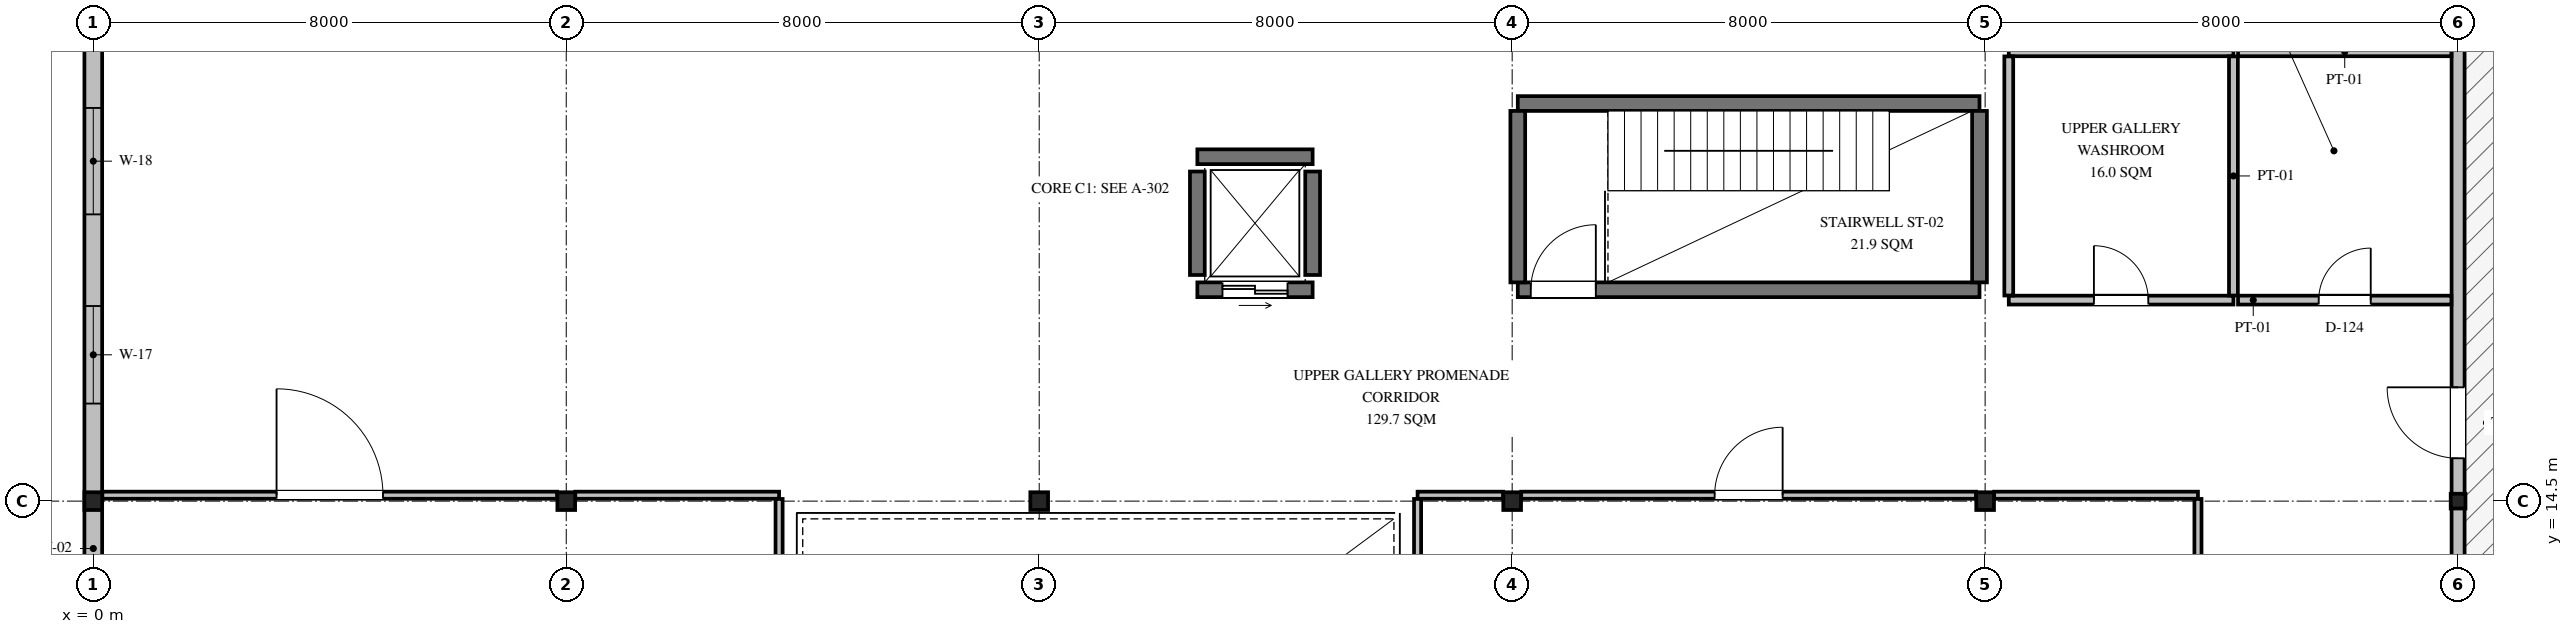
"""IFC4 building model, lengths in metres.
Left out: names, types, materials, properties, quantities, classifications, styles, units other than length and angle.
Written with IfcOpenShell. Run it as: python <this file> out.ifc"""

import sys

from ifc_helpers import new_model, si_unit, direction, frame, frame_2d, origin, origin_2d, place, context, subcontext, project, spatial, rectangle, hollow_rectangle, i_section, extrude, element, fill, save


model = new_model("IFC4")
c1 = context("Model", 3, precision=1e-05, world=origin(), true_north=direction((0.0, 1.0)))
c2 = subcontext(c1, "Body", "Model", "MODEL_VIEW")
j1 = project(units=[si_unit("LENGTHUNIT", "METRE"), si_unit("PLANEANGLEUNIT", "RADIAN")], contexts=[c1])
p1 = place(None, origin())
s1 = spatial("IfcSite", under=j1, at=p1, CompositionType="ELEMENT")
p2 = place(p1, origin())
s2 = spatial("IfcBuilding", under=s1, at=p2, CompositionType="ELEMENT")
p3 = place(p2, frame((0.0, 0.0, 5.85)))
s3 = spatial("IfcBuildingStorey", under=s2, at=p3, CompositionType="ELEMENT", Elevation=5.85)
for number, where, z_axis, x_axis in (
    (1, (0.0, 14.5, 0.0), (0.0, 0.0, 1.0), (1.0, 0.0, 0.0)),
    (2, (8.0, 14.5, 0.0), (0.0, 0.0, 1.0), (1.0, 0.0, 0.0)),
    (3, (16.0, 14.5, 0.0), (0.0, 0.0, 1.0), (1.0, 0.0, 0.0)),
    (4, (24.0, 14.5, 0.0), (0.0, 0.0, 1.0), (1.0, 0.0, 0.0)),
    (5, (32.0, 14.5, 0.0), (0.0, 0.0, 1.0), (1.0, 0.0, 0.0)),
):
    element("IfcColumn", number, at=place(p3, frame(where, z_axis=z_axis, x_axis=x_axis)), inside=s3, PredefinedType="COLUMN", context=c2, shape_type="SweptSolid", body=[
        extrude(i_section(OverallWidth=0.3, OverallDepth=0.3, WebThickness=0.01, FlangeThickness=0.015, FilletRadius=0.018, at=origin_2d()), origin(), (0.0, 0.0, 1.0), 4.2),
    ])
p4 = place(p3, frame((40.0, 14.5, 0.0), z_axis=(0.0, 0.0, 1.0), x_axis=(1.0, 0.0, 0.0)))
e6 = element("IfcColumn", 6, at=p4, inside=s3, PredefinedType="COLUMN", context=c2, shape_type="SweptSolid", body=[
    extrude(hollow_rectangle(XDim=0.25, YDim=0.25, WallThickness=0.012, at=origin_2d()), origin(), (0.0, 0.0, 1.0), 4.2),
])
p5 = place(p3, frame((0.0, 0.15, 0.0), z_axis=(0.0, 0.0, 1.0), x_axis=(0.0, 1.0, 0.0)))
e7 = element("IfcWall", 7, at=p5, inside=s3, PredefinedType="SOLIDWALL", context=c2, shape_type="SweptSolid", body=[
    extrude(rectangle(XDim=22.2, YDim=0.3, at=frame_2d((11.1, 0.0))), origin(), (0.0, 0.0, 1.0), 3.344),
])
p6 = place(p5, frame((9.2, 0.0, 1.05)))
e8 = element("IfcOpeningElement", 8, at=p6, cuts=e7, PredefinedType="OPENING", context=c2, shape_type="SweptSolid", body=[
    extrude(rectangle(XDim=1.5, YDim=1.5, at=frame_2d((0.75, 0.75))), frame((0.0, 0.16, 0.0), z_axis=(0.0, -1.0, 0.0), x_axis=(1.0, 0.0, 0.0)), (0.0, 0.0, 1.0), 0.32),
])
p7 = place(p5, frame((16.0, 0.0, 1.05)))
e9 = element("IfcOpeningElement", 9, at=p7, cuts=e7, PredefinedType="OPENING", context=c2, shape_type="SweptSolid", body=[
    extrude(rectangle(XDim=1.65, YDim=1.5, at=frame_2d((0.825, 0.75))), frame((0.0, 0.16, 0.0), z_axis=(0.0, -1.0, 0.0), x_axis=(1.0, 0.0, 0.0)), (0.0, 0.0, 1.0), 0.32),
])
p8 = place(p5, frame((19.2, 0.0, 1.05)))
e10 = element("IfcOpeningElement", 10, at=p8, cuts=e7, PredefinedType="OPENING", context=c2, shape_type="SweptSolid", body=[
    extrude(rectangle(XDim=1.8, YDim=1.5, at=frame_2d((0.9, 0.75))), frame((0.0, 0.16, 0.0), z_axis=(0.0, -1.0, 0.0), x_axis=(1.0, 0.0, 0.0)), (0.0, 0.0, 1.0), 0.32),
])
p9 = place(p3, frame((40.0, 0.125, 0.0), z_axis=(0.0, 0.0, 1.0), x_axis=(0.0, 1.0, 0.0)))
e11 = element("IfcWall", 11, at=p9, inside=s3, PredefinedType="SOLIDWALL", context=c2, shape_type="SweptSolid", body=[
    extrude(rectangle(XDim=22.25, YDim=0.22, at=frame_2d((11.125, 0.0))), origin(), (0.0, 0.0, 1.0), 3.554),
])
p10 = place(p9, frame((15.1, 0.0, 0.0)))
e12 = element("IfcOpeningElement", 12, at=p10, cuts=e11, PredefinedType="OPENING", context=c2, shape_type="SweptSolid", body=[
    extrude(rectangle(XDim=1.2, YDim=2.2, at=frame_2d((0.6, 1.1))), frame((0.0, 0.12, 0.0), z_axis=(0.0, -1.0, 0.0), x_axis=(1.0, 0.0, 0.0)), (0.0, 0.0, 1.0), 0.24),
])
p11 = place(p9, frame((3.0, 0.0, 1.0)))
e13 = element("IfcOpeningElement", 13, at=p11, cuts=e11, PredefinedType="OPENING", context=c2, shape_type="SweptSolid", body=[
    extrude(rectangle(XDim=1.3, YDim=1.3, at=frame_2d((0.65, 0.65))), frame((0.0, 0.12, 0.0), z_axis=(0.0, -1.0, 0.0), x_axis=(1.0, 0.0, 0.0)), (0.0, 0.0, 1.0), 0.24),
])
p12 = place(p9, frame((9.5, 0.0, 1.0)))
e14 = element("IfcOpeningElement", 14, at=p12, cuts=e11, PredefinedType="OPENING", context=c2, shape_type="SweptSolid", body=[
    extrude(rectangle(XDim=1.55, YDim=1.3, at=frame_2d((0.775, 0.65))), frame((0.0, 0.12, 0.0), z_axis=(0.0, -1.0, 0.0), x_axis=(1.0, 0.0, 0.0)), (0.0, 0.0, 1.0), 0.24),
])
p13 = place(p3, frame((24.095, 18.075, 0.0), z_axis=(0.0, 0.0, 1.0), x_axis=(1.0, 0.0, 0.0)))
e15 = element("IfcWall", 15, at=p13, inside=s3, PredefinedType="SHEAR", context=c2, shape_type="SweptSolid", body=[
    extrude(rectangle(XDim=7.81, YDim=0.25, at=frame_2d((3.905, 0.0))), origin(), (0.0, 0.0, 1.0), 4.0),
])
p14 = place(p13, frame((0.22, 0.0, 0.0)))
e16 = element("IfcOpeningElement", 16, at=p14, cuts=e15, PredefinedType="OPENING", context=c2, shape_type="SweptSolid", body=[
    extrude(rectangle(XDim=1.1, YDim=2.15, at=frame_2d((0.55, 1.075))), frame((0.0, 0.135, 0.0), z_axis=(0.0, -1.0, 0.0), x_axis=(1.0, 0.0, 0.0)), (0.0, 0.0, 1.0), 0.27),
])
p15 = place(p3, frame((24.095, 21.225, 0.0), z_axis=(0.0, 0.0, 1.0), x_axis=(1.0, 0.0, 0.0)))
e17 = element("IfcWall", 17, at=p15, inside=s3, PredefinedType="SHEAR", context=c2, shape_type="SweptSolid", body=[
    extrude(rectangle(XDim=7.81, YDim=0.25, at=frame_2d((3.905, 0.0))), origin(), (0.0, 0.0, 1.0), 4.0),
])
for number, where, z_axis, x_axis in (
    (18, (24.095, 18.2, 0.0), (0.0, 0.0, 1.0), (0.0, 1.0, 0.0)),
    (19, (31.905, 18.2, 0.0), (0.0, 0.0, 1.0), (0.0, 1.0, 0.0)),
):
    element("IfcWall", number, at=place(p3, frame(where, z_axis=z_axis, x_axis=x_axis)), inside=s3, PredefinedType="SHEAR", context=c2, shape_type="SweptSolid", body=[
        extrude(rectangle(XDim=2.9, YDim=0.25, at=frame_2d((1.45, 0.0))), origin(), (0.0, 0.0, 1.0), 4.0),
    ])
p16 = place(p3, frame((18.675, 18.075, 0.0), z_axis=(0.0, 0.0, 1.0), x_axis=(1.0, 0.0, 0.0)))
e20 = element("IfcWall", 20, at=p16, inside=s3, PredefinedType="SHEAR", context=c2, shape_type="SweptSolid", body=[
    extrude(rectangle(XDim=1.95, YDim=0.25, at=frame_2d((0.975, 0.0))), origin(), (0.0, 0.0, 1.0), 4.0),
])
p17 = place(p16, frame((0.425, 0.0, 0.0)))
e21 = element("IfcOpeningElement", 21, at=p17, cuts=e20, PredefinedType="OPENING", context=c2, shape_type="SweptSolid", body=[
    extrude(rectangle(XDim=1.1, YDim=2.15, at=frame_2d((0.55, 1.075))), frame((0.0, 0.135, 0.0), z_axis=(0.0, -1.0, 0.0), x_axis=(1.0, 0.0, 0.0)), (0.0, 0.0, 1.0), 0.27),
])
p18 = place(p3, frame((18.675, 20.325, 0.0), z_axis=(0.0, 0.0, 1.0), x_axis=(1.0, 0.0, 0.0)))
e22 = element("IfcWall", 22, at=p18, inside=s3, PredefinedType="SHEAR", context=c2, shape_type="SweptSolid", body=[
    extrude(rectangle(XDim=1.95, YDim=0.25, at=frame_2d((0.975, 0.0))), origin(), (0.0, 0.0, 1.0), 4.0),
])
for number, where, z_axis, x_axis in (
    (23, (18.675, 18.325, 0.0), (0.0, 0.0, 1.0), (0.0, 1.0, 0.0)),
    (24, (20.625, 18.325, 0.0), (0.0, 0.0, 1.0), (0.0, 1.0, 0.0)),
):
    element("IfcWall", number, at=place(p3, frame(where, z_axis=z_axis, x_axis=x_axis)), inside=s3, PredefinedType="SHEAR", context=c2, shape_type="SweptSolid", body=[
        extrude(rectangle(XDim=1.75, YDim=0.25, at=frame_2d((0.875, 0.0))), origin(), (0.0, 0.0, 1.0), 4.0),
    ])
p19 = place(p3, frame((0.153, 14.6, 0.0), z_axis=(0.0, 0.0, 1.0), x_axis=(1.0, 0.0, 0.0)))
e25 = element("IfcWall", 25, at=p19, inside=s3, PredefinedType="PARTITIONING", context=c2, shape_type="SweptSolid", body=[
    extrude(rectangle(XDim=7.694, YDim=0.12, at=frame_2d((3.847, 0.0))), origin(), (0.0, 0.0, 1.0), 3.406),
])
p20 = place(p19, frame((2.947, 0.0, 0.0)))
e26 = element("IfcOpeningElement", 26, at=p20, cuts=e25, PredefinedType="OPENING", context=c2, shape_type="SweptSolid", body=[
    extrude(rectangle(XDim=1.8, YDim=2.3, at=frame_2d((0.9, 1.15))), frame((0.0, 0.07, 0.0), z_axis=(0.0, -1.0, 0.0), x_axis=(1.0, 0.0, 0.0)), (0.0, 0.0, 1.0), 0.14),
])
p21 = place(p3, frame((8.153, 14.6, 0.0), z_axis=(0.0, 0.0, 1.0), x_axis=(1.0, 0.0, 0.0)))
e27 = element("IfcWall", 27, at=p21, inside=s3, PredefinedType="PARTITIONING", context=c2, shape_type="SweptSolid", body=[
    extrude(rectangle(XDim=3.447, YDim=0.12, at=frame_2d((1.724, 0.0))), origin(), (0.0, 0.0, 1.0), 3.194),
])
p22 = place(p3, frame((11.6, 6.663, 0.0), z_axis=(0.0, 0.0, 1.0), x_axis=(0.0, 1.0, 0.0)))
e28 = element("IfcWall", 28, at=p22, inside=s3, PredefinedType="PARTITIONING", context=c2, shape_type="SweptSolid", body=[
    extrude(rectangle(XDim=7.874, YDim=0.12, at=frame_2d((3.937, 0.0))), origin(), (0.0, 0.0, 1.0), 4.0),
])
p23 = place(p3, frame((22.4, 14.6, 0.0), z_axis=(0.0, 0.0, 1.0), x_axis=(1.0, 0.0, 0.0)))
e29 = element("IfcWall", 29, at=p23, inside=s3, PredefinedType="PARTITIONING", context=c2, shape_type="SweptSolid", body=[
    extrude(rectangle(XDim=1.447, YDim=0.12, at=frame_2d((0.724, 0.0))), origin(), (0.0, 0.0, 1.0), 3.094),
])
p24 = place(p3, frame((24.153, 14.6, 0.0), z_axis=(0.0, 0.0, 1.0), x_axis=(1.0, 0.0, 0.0)))
e30 = element("IfcWall", 30, at=p24, inside=s3, PredefinedType="PARTITIONING", context=c2, shape_type="SweptSolid", body=[
    extrude(rectangle(XDim=7.694, YDim=0.12, at=frame_2d((3.847, 0.0))), origin(), (0.0, 0.0, 1.0), 2.894),
])
p25 = place(p24, frame((3.272, 0.0, 0.0)))
e31 = element("IfcOpeningElement", 31, at=p25, cuts=e30, PredefinedType="OPENING", context=c2, shape_type="SweptSolid", body=[
    extrude(rectangle(XDim=1.15, YDim=2.1, at=frame_2d((0.575, 1.05))), frame((0.0, 0.07, 0.0), z_axis=(0.0, -1.0, 0.0), x_axis=(1.0, 0.0, 0.0)), (0.0, 0.0, 1.0), 0.14),
])
p26 = place(p3, frame((32.153, 14.6, 0.0), z_axis=(0.0, 0.0, 1.0), x_axis=(1.0, 0.0, 0.0)))
e32 = element("IfcWall", 32, at=p26, inside=s3, PredefinedType="PARTITIONING", context=c2, shape_type="SweptSolid", body=[
    extrude(rectangle(XDim=3.447, YDim=0.12, at=frame_2d((1.724, 0.0))), origin(), (0.0, 0.0, 1.0), 3.344),
])
for number, where, z_axis, x_axis in (
    (33, (22.4, 6.663, 0.0), (0.0, 0.0, 1.0), (0.0, 1.0, 0.0)),
    (34, (35.6, 6.663, 0.0), (0.0, 0.0, 1.0), (0.0, 1.0, 0.0)),
):
    element("IfcWall", number, at=place(p3, frame(where, z_axis=z_axis, x_axis=x_axis)), inside=s3, PredefinedType="PARTITIONING", context=c2, shape_type="SweptSolid", body=[
        extrude(rectangle(XDim=7.874, YDim=0.12, at=frame_2d((3.937, 0.0))), origin(), (0.0, 0.0, 1.0), 4.0),
    ])
p27 = place(p3, frame((32.4, 17.9, 0.0), z_axis=(0.0, 0.0, 1.0), x_axis=(1.0, 0.0, 0.0)))
e35 = element("IfcWall", 35, at=p27, inside=s3, PredefinedType="PARTITIONING", context=c2, shape_type="SweptSolid", body=[
    extrude(rectangle(XDim=3.8, YDim=0.15, at=frame_2d((1.9, 0.0))), origin(), (0.0, 0.0, 1.0), 4.0),
])
p28 = place(p27, frame((1.44, 0.0, 0.0)))
e36 = element("IfcOpeningElement", 36, at=p28, cuts=e35, PredefinedType="OPENING", context=c2, shape_type="SweptSolid", body=[
    extrude(rectangle(XDim=0.92, YDim=2.1, at=frame_2d((0.46, 1.05))), frame((0.0, 0.085, 0.0), z_axis=(0.0, -1.0, 0.0), x_axis=(1.0, 0.0, 0.0)), (0.0, 0.0, 1.0), 0.17),
])
p29 = place(p3, frame((32.4, 22.1, 0.0), z_axis=(0.0, 0.0, 1.0), x_axis=(1.0, 0.0, 0.0)))
e37 = element("IfcWall", 37, at=p29, inside=s3, PredefinedType="PARTITIONING", context=c2, shape_type="SweptSolid", body=[
    extrude(rectangle(XDim=3.8, YDim=0.15, at=frame_2d((1.9, 0.0))), origin(), (0.0, 0.0, 1.0), 4.0),
])
p30 = place(p3, frame((32.4, 17.978, 0.0), z_axis=(0.0, 0.0, 1.0), x_axis=(0.0, 1.0, 0.0)))
e38 = element("IfcWall", 38, at=p30, inside=s3, PredefinedType="PARTITIONING", context=c2, shape_type="SweptSolid", body=[
    extrude(rectangle(XDim=4.044, YDim=0.15, at=frame_2d((2.022, 0.0))), origin(), (0.0, 0.0, 1.0), 4.0),
])
p31 = place(p3, frame((36.2, 17.978, 0.0), z_axis=(0.0, 0.0, 1.0), x_axis=(0.0, 1.0, 0.0)))
e39 = element("IfcWall", 39, at=p31, inside=s3, PredefinedType="PARTITIONING", context=c2, shape_type="SweptSolid", body=[
    extrude(rectangle(XDim=4.044, YDim=0.15, at=frame_2d((2.022, 0.0))), origin(), (0.0, 0.0, 1.0), 3.744),
])
p32 = place(p3, frame((36.278, 17.9, 0.0), z_axis=(0.0, 0.0, 1.0), x_axis=(1.0, 0.0, 0.0)))
e40 = element("IfcWall", 40, at=p32, inside=s3, PredefinedType="PARTITIONING", context=c2, shape_type="SweptSolid", body=[
    extrude(rectangle(XDim=3.609, YDim=0.15, at=frame_2d((1.804, 0.0))), origin(), (0.0, 0.0, 1.0), 4.0),
])
p33 = place(p32, frame((1.365, 0.0, 0.0)))
e41 = element("IfcOpeningElement", 41, at=p33, cuts=e40, PredefinedType="OPENING", context=c2, shape_type="SweptSolid", body=[
    extrude(rectangle(XDim=0.88, YDim=2.1, at=frame_2d((0.44, 1.05))), frame((0.0, 0.085, 0.0), z_axis=(0.0, -1.0, 0.0), x_axis=(1.0, 0.0, 0.0)), (0.0, 0.0, 1.0), 0.17),
])
p34 = place(p3, frame((36.278, 22.1, 0.0), z_axis=(0.0, 0.0, 1.0), x_axis=(1.0, 0.0, 0.0)))
e42 = element("IfcWall", 42, at=p34, inside=s3, PredefinedType="PARTITIONING", context=c2, shape_type="SweptSolid", body=[
    extrude(rectangle(XDim=3.609, YDim=0.15, at=frame_2d((1.804, 0.0))), origin(), (0.0, 0.0, 1.0), 4.0),
])
p35 = place(p7, origin())
e43 = element("IfcWindow", 43, at=p35, inside=s3, PartitioningType="SINGLE_PANEL", PredefinedType="WINDOW", context=c2, shape_type="SweptSolid", body=[
    extrude(rectangle(XDim=1.65, YDim=1.5, at=frame_2d((0.825, 0.75))), frame((0.0, 0.03, 0.0), z_axis=(0.0, -1.0, 0.0), x_axis=(1.0, 0.0, 0.0)), (0.0, 0.0, 1.0), 0.06),
])
fill(e9, e43)
p36 = place(p8, origin())
e44 = element("IfcWindow", 44, at=p36, inside=s3, PartitioningType="SINGLE_PANEL", PredefinedType="WINDOW", context=c2, shape_type="SweptSolid", body=[
    extrude(rectangle(XDim=1.8, YDim=1.5, at=frame_2d((0.9, 0.75))), frame((0.0, 0.03, 0.0), z_axis=(0.0, -1.0, 0.0), x_axis=(1.0, 0.0, 0.0)), (0.0, 0.0, 1.0), 0.06),
])
fill(e10, e44)
p37 = place(p10, frame((1.2, 0.0, 0.0), z_axis=(0.0, 0.0, 1.0), x_axis=(-1.0, 0.0, 0.0)))
e45 = element("IfcDoor", 45, at=p37, inside=s3, OperationType="SINGLE_SWING_RIGHT", PredefinedType="DOOR", context=c2, shape_type="SweptSolid", body=[
    extrude(rectangle(XDim=1.2, YDim=2.2, at=frame_2d((0.6, 1.1))), frame((0.0, 0.025, 0.0), z_axis=(0.0, -1.0, 0.0), x_axis=(1.0, 0.0, 0.0)), (0.0, 0.0, 1.0), 0.05),
])
fill(e12, e45)
p38 = place(p14, frame((1.1, 0.0, 0.0), z_axis=(0.0, 0.0, 1.0), x_axis=(-1.0, 0.0, 0.0)))
e46 = element("IfcDoor", 46, at=p38, inside=s3, OperationType="SINGLE_SWING_RIGHT", PredefinedType="DOOR", context=c2, shape_type="SweptSolid", body=[
    extrude(rectangle(XDim=1.1, YDim=2.15, at=frame_2d((0.55, 1.075))), frame((0.0, 0.025, 0.0), z_axis=(0.0, -1.0, 0.0), x_axis=(1.0, 0.0, 0.0)), (0.0, 0.0, 1.0), 0.05),
])
fill(e16, e46)
p39 = place(p17, origin())
e47 = element("IfcDoor", 47, at=p39, inside=s3, OperationType="DOUBLE_DOOR_SLIDING", PredefinedType="DOOR", context=c2, shape_type="SweptSolid", body=[
    extrude(rectangle(XDim=1.1, YDim=2.15, at=frame_2d((0.55, 1.075))), frame((0.0, 0.025, 0.0), z_axis=(0.0, -1.0, 0.0), x_axis=(1.0, 0.0, 0.0)), (0.0, 0.0, 1.0), 0.05),
])
fill(e21, e47)
p40 = place(p20, origin())
e48 = element("IfcDoor", 48, at=p40, inside=s3, OperationType="SINGLE_SWING_LEFT", PredefinedType="DOOR", context=c2, shape_type="SweptSolid", body=[
    extrude(rectangle(XDim=1.8, YDim=2.3, at=frame_2d((0.9, 1.15))), frame((0.0, 0.025, 0.0), z_axis=(0.0, -1.0, 0.0), x_axis=(1.0, 0.0, 0.0)), (0.0, 0.0, 1.0), 0.05),
])
fill(e26, e48)
p41 = place(p25, origin())
e49 = element("IfcDoor", 49, at=p41, inside=s3, OperationType="SINGLE_SWING_RIGHT", PredefinedType="DOOR", context=c2, shape_type="SweptSolid", body=[
    extrude(rectangle(XDim=1.15, YDim=2.1, at=frame_2d((0.575, 1.05))), frame((0.0, 0.025, 0.0), z_axis=(0.0, -1.0, 0.0), x_axis=(1.0, 0.0, 0.0)), (0.0, 0.0, 1.0), 0.05),
])
fill(e31, e49)
p42 = place(p28, origin())
e50 = element("IfcDoor", 50, at=p42, inside=s3, OperationType="SINGLE_SWING_LEFT", PredefinedType="DOOR", context=c2, shape_type="SweptSolid", body=[
    extrude(rectangle(XDim=0.92, YDim=2.1, at=frame_2d((0.46, 1.05))), frame((0.0, 0.025, 0.0), z_axis=(0.0, -1.0, 0.0), x_axis=(1.0, 0.0, 0.0)), (0.0, 0.0, 1.0), 0.05),
])
fill(e36, e50)
p43 = place(p33, origin())
e51 = element("IfcDoor", 51, at=p43, inside=s3, OperationType="SINGLE_SWING_RIGHT", PredefinedType="DOOR", context=c2, shape_type="SweptSolid", body=[
    extrude(rectangle(XDim=0.88, YDim=2.1, at=frame_2d((0.44, 1.05))), frame((0.0, 0.025, 0.0), z_axis=(0.0, -1.0, 0.0), x_axis=(1.0, 0.0, 0.0)), (0.0, 0.0, 1.0), 0.05),
])
fill(e41, e51)
save(model, sys.argv[1])
